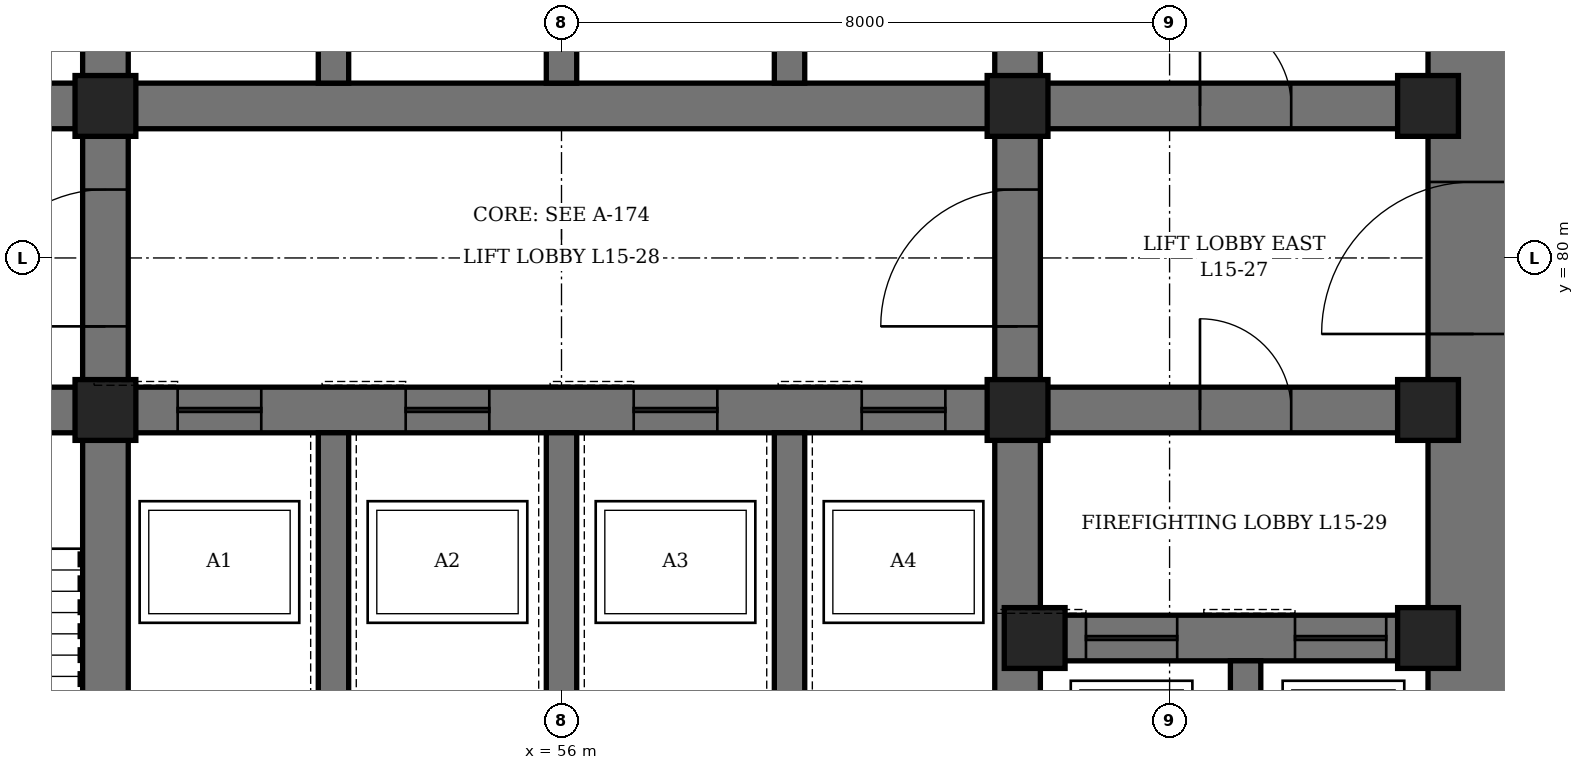
"""IFC4 building model, lengths in metres.
Left out: names, types, materials, properties, quantities, classifications, styles, units other than length and angle.
Written with IfcOpenShell. Run it as: python <this file> out.ifc"""

import sys

from ifc_helpers import new_model, si_unit, direction, frame, frame_2d, origin, origin_2d, place, context, subcontext, project, spatial, rectangle, hollow_rectangle, extrude, element, fill, save


model = new_model("IFC4")
c1 = context("Model", 3, precision=1e-05, world=origin(), true_north=direction((0.0, 1.0)))
c2 = subcontext(c1, "Body", "Model", "MODEL_VIEW")
j1 = project(units=[si_unit("LENGTHUNIT", "METRE"), si_unit("PLANEANGLEUNIT", "RADIAN")], contexts=[c1])
p1 = place(None, origin())
s1 = spatial("IfcSite", under=j1, at=p1, CompositionType="ELEMENT")
p2 = place(p1, origin())
s2 = spatial("IfcBuilding", under=s1, at=p2, CompositionType="ELEMENT")
p3 = place(p2, frame((0.0, 0.0, 72.7)))
s3 = spatial("IfcBuildingStorey", under=s2, at=p3, CompositionType="ELEMENT", Elevation=72.7)
p4 = place(p3, frame((68.0, 70.4, 0.0), z_axis=(0.0, 0.0, 1.0), x_axis=(0.0, 1.0, 0.0)))
e1 = element("IfcWall", 1, at=p4, inside=s3, PredefinedType="SHEAR", context=c2, shape_type="SweptSolid", body=[
    extrude(rectangle(XDim=19.2, YDim=1.2, at=frame_2d((9.6, 0.0))), origin(), (0.0, 0.0, 1.0), 4.2),
])
p5 = place(p4, frame((8.6, 0.0, 0.0)))
e2 = element("IfcOpeningElement", 2, at=p5, cuts=e1, PredefinedType="OPENING", context=c2, shape_type="SweptSolid", body=[
    extrude(rectangle(XDim=2.0, YDim=2.4, at=frame_2d((1.0, 1.2))), frame((0.0, 0.61, 0.0), z_axis=(0.0, -1.0, 0.0), x_axis=(1.0, 0.0, 0.0)), (0.0, 0.0, 1.0), 1.22),
])
p6 = place(p3, frame((50.0, 71.6, 0.0), z_axis=(0.0, 0.0, 1.0), x_axis=(0.0, 1.0, 0.0)))
e3 = element("IfcWall", 3, at=p6, inside=s3, PredefinedType="SHEAR", context=c2, shape_type="SweptSolid", body=[
    extrude(rectangle(XDim=16.8, YDim=0.6, at=frame_2d((8.4, 0.0))), origin(), (0.0, 0.0, 1.0), 4.2),
])
p7 = place(p6, frame((7.5, 0.0, 0.0)))
e4 = element("IfcOpeningElement", 4, at=p7, cuts=e3, PredefinedType="OPENING", context=c2, shape_type="SweptSolid", body=[
    extrude(rectangle(XDim=1.8, YDim=2.4, at=frame_2d((0.9, 1.2))), frame((0.0, 0.31, 0.0), z_axis=(0.0, -1.0, 0.0), x_axis=(1.0, 0.0, 0.0)), (0.0, 0.0, 1.0), 0.62),
])
p8 = place(p3, frame((62.0, 71.6, 0.0), z_axis=(0.0, 0.0, 1.0), x_axis=(0.0, 1.0, 0.0)))
e5 = element("IfcWall", 5, at=p8, inside=s3, PredefinedType="SHEAR", context=c2, shape_type="SweptSolid", body=[
    extrude(rectangle(XDim=16.8, YDim=0.6, at=frame_2d((8.4, 0.0))), origin(), (0.0, 0.0, 1.0), 4.2),
])
p9 = place(p8, frame((7.5, 0.0, 0.0)))
e6 = element("IfcOpeningElement", 6, at=p9, cuts=e5, PredefinedType="OPENING", context=c2, shape_type="SweptSolid", body=[
    extrude(rectangle(XDim=1.8, YDim=2.4, at=frame_2d((0.9, 1.2))), frame((0.0, 0.31, 0.0), z_axis=(0.0, -1.0, 0.0), x_axis=(1.0, 0.0, 0.0)), (0.0, 0.0, 1.0), 0.62),
])
p10 = place(p3, frame((44.6, 78.0, 0.0), z_axis=(0.0, 0.0, 1.0), x_axis=(1.0, 0.0, 0.0)))
e7 = element("IfcWall", 7, at=p10, inside=s3, PredefinedType="SHEAR", context=c2, shape_type="SweptSolid", body=[
    extrude(rectangle(XDim=5.1, YDim=0.6, at=frame_2d((2.55, 0.0))), origin(), (0.0, 0.0, 1.0), 4.2),
])
p11 = place(p10, frame((1.8, 0.0, 0.0)))
e8 = element("IfcOpeningElement", 8, at=p11, cuts=e7, PredefinedType="OPENING", context=c2, shape_type="SweptSolid", body=[
    extrude(rectangle(XDim=1.2, YDim=2.1, at=frame_2d((0.6, 1.05))), frame((0.0, 0.31, 0.0), z_axis=(0.0, -1.0, 0.0), x_axis=(1.0, 0.0, 0.0)), (0.0, 0.0, 1.0), 0.62),
])
p12 = place(p3, frame((44.6, 82.0, 0.0), z_axis=(0.0, 0.0, 1.0), x_axis=(1.0, 0.0, 0.0)))
e9 = element("IfcWall", 9, at=p12, inside=s3, PredefinedType="SHEAR", context=c2, shape_type="SweptSolid", body=[
    extrude(rectangle(XDim=5.1, YDim=0.6, at=frame_2d((2.55, 0.0))), origin(), (0.0, 0.0, 1.0), 4.2),
])
p13 = place(p12, frame((0.7, 0.0, 0.0)))
e10 = element("IfcOpeningElement", 10, at=p13, cuts=e9, PredefinedType="OPENING", context=c2, shape_type="SweptSolid", body=[
    extrude(rectangle(XDim=0.9, YDim=2.1, at=frame_2d((0.45, 1.05))), frame((0.0, 0.31, 0.0), z_axis=(0.0, -1.0, 0.0), x_axis=(1.0, 0.0, 0.0)), (0.0, 0.0, 1.0), 0.62),
])
p14 = place(p3, frame((62.3, 75.0, 0.0), z_axis=(0.0, 0.0, 1.0), x_axis=(1.0, 0.0, 0.0)))
e11 = element("IfcWall", 11, at=p14, inside=s3, PredefinedType="SHEAR", context=c2, shape_type="SweptSolid", body=[
    extrude(rectangle(XDim=5.1, YDim=0.6, at=frame_2d((2.55, 0.0))), origin(), (0.0, 0.0, 1.0), 4.2),
])
p15 = place(p14, frame((0.6, 0.0, 0.0)))
e12 = element("IfcOpeningElement", 12, at=p15, cuts=e11, PredefinedType="OPENING", context=c2, shape_type="SweptSolid", body=[
    extrude(rectangle(XDim=1.2, YDim=2.2, at=frame_2d((0.6, 1.1))), frame((0.0, 0.31, 0.0), z_axis=(0.0, -1.0, 0.0), x_axis=(1.0, 0.0, 0.0)), (0.0, 0.0, 1.0), 0.62),
])
p16 = place(p14, frame((3.35, 0.0, 0.0)))
e13 = element("IfcOpeningElement", 13, at=p16, cuts=e11, PredefinedType="OPENING", context=c2, shape_type="SweptSolid", body=[
    extrude(rectangle(XDim=1.2, YDim=2.2, at=frame_2d((0.6, 1.1))), frame((0.0, 0.31, 0.0), z_axis=(0.0, -1.0, 0.0), x_axis=(1.0, 0.0, 0.0)), (0.0, 0.0, 1.0), 0.62),
])
p17 = place(p3, frame((62.3, 78.0, 0.0), z_axis=(0.0, 0.0, 1.0), x_axis=(1.0, 0.0, 0.0)))
e14 = element("IfcWall", 14, at=p17, inside=s3, PredefinedType="SHEAR", context=c2, shape_type="SweptSolid", body=[
    extrude(rectangle(XDim=5.1, YDim=0.6, at=frame_2d((2.55, 0.0))), origin(), (0.0, 0.0, 1.0), 4.2),
])
p18 = place(p17, frame((2.1, 0.0, 0.0)))
e15 = element("IfcOpeningElement", 15, at=p18, cuts=e14, PredefinedType="OPENING", context=c2, shape_type="SweptSolid", body=[
    extrude(rectangle(XDim=1.2, YDim=2.1, at=frame_2d((0.6, 1.05))), frame((0.0, 0.31, 0.0), z_axis=(0.0, -1.0, 0.0), x_axis=(1.0, 0.0, 0.0)), (0.0, 0.0, 1.0), 0.62),
])
p19 = place(p3, frame((62.3, 82.0, 0.0), z_axis=(0.0, 0.0, 1.0), x_axis=(1.0, 0.0, 0.0)))
e16 = element("IfcWall", 16, at=p19, inside=s3, PredefinedType="SHEAR", context=c2, shape_type="SweptSolid", body=[
    extrude(rectangle(XDim=5.1, YDim=0.6, at=frame_2d((2.55, 0.0))), origin(), (0.0, 0.0, 1.0), 4.2),
])
p20 = place(p19, frame((2.1, 0.0, 0.0)))
e17 = element("IfcOpeningElement", 17, at=p20, cuts=e16, PredefinedType="OPENING", context=c2, shape_type="SweptSolid", body=[
    extrude(rectangle(XDim=1.2, YDim=2.1, at=frame_2d((0.6, 1.05))), frame((0.0, 0.31, 0.0), z_axis=(0.0, -1.0, 0.0), x_axis=(1.0, 0.0, 0.0)), (0.0, 0.0, 1.0), 0.62),
])
p21 = place(p3, frame((50.3, 78.0, 0.0), z_axis=(0.0, 0.0, 1.0), x_axis=(1.0, 0.0, 0.0)))
e18 = element("IfcWall", 18, at=p21, inside=s3, PredefinedType="SHEAR", context=c2, shape_type="SweptSolid", body=[
    extrude(rectangle(XDim=11.4, YDim=0.6, at=frame_2d((5.7, 0.0))), origin(), (0.0, 0.0, 1.0), 4.2),
])
p22 = place(p21, frame((0.65, 0.0, 0.0)))
e19 = element("IfcOpeningElement", 19, at=p22, cuts=e18, PredefinedType="OPENING", context=c2, shape_type="SweptSolid", body=[
    extrude(rectangle(XDim=1.1, YDim=2.2, at=frame_2d((0.55, 1.1))), frame((0.0, 0.31, 0.0), z_axis=(0.0, -1.0, 0.0), x_axis=(1.0, 0.0, 0.0)), (0.0, 0.0, 1.0), 0.62),
])
p23 = place(p21, frame((3.65, 0.0, 0.0)))
e20 = element("IfcOpeningElement", 20, at=p23, cuts=e18, PredefinedType="OPENING", context=c2, shape_type="SweptSolid", body=[
    extrude(rectangle(XDim=1.1, YDim=2.2, at=frame_2d((0.55, 1.1))), frame((0.0, 0.31, 0.0), z_axis=(0.0, -1.0, 0.0), x_axis=(1.0, 0.0, 0.0)), (0.0, 0.0, 1.0), 0.62),
])
p24 = place(p21, frame((6.65, 0.0, 0.0)))
e21 = element("IfcOpeningElement", 21, at=p24, cuts=e18, PredefinedType="OPENING", context=c2, shape_type="SweptSolid", body=[
    extrude(rectangle(XDim=1.1, YDim=2.2, at=frame_2d((0.55, 1.1))), frame((0.0, 0.31, 0.0), z_axis=(0.0, -1.0, 0.0), x_axis=(1.0, 0.0, 0.0)), (0.0, 0.0, 1.0), 0.62),
])
p25 = place(p21, frame((9.65, 0.0, 0.0)))
e22 = element("IfcOpeningElement", 22, at=p25, cuts=e18, PredefinedType="OPENING", context=c2, shape_type="SweptSolid", body=[
    extrude(rectangle(XDim=1.1, YDim=2.2, at=frame_2d((0.55, 1.1))), frame((0.0, 0.31, 0.0), z_axis=(0.0, -1.0, 0.0), x_axis=(1.0, 0.0, 0.0)), (0.0, 0.0, 1.0), 0.62),
])
p26 = place(p3, frame((50.3, 82.0, 0.0), z_axis=(0.0, 0.0, 1.0), x_axis=(1.0, 0.0, 0.0)))
e23 = element("IfcWall", 23, at=p26, inside=s3, PredefinedType="SHEAR", context=c2, shape_type="SweptSolid", body=[
    extrude(rectangle(XDim=11.4, YDim=0.6, at=frame_2d((5.7, 0.0))), origin(), (0.0, 0.0, 1.0), 4.2),
])
p27 = place(p3, frame((53.0, 74.2, 0.0), z_axis=(0.0, 0.0, 1.0), x_axis=(0.0, 1.0, 0.0)))
e24 = element("IfcWall", 24, at=p27, inside=s3, PredefinedType="SHEAR", context=c2, shape_type="SweptSolid", body=[
    extrude(rectangle(XDim=3.5, YDim=0.4, at=frame_2d((1.75, 0.0))), origin(), (0.0, 0.0, 1.0), 4.2),
])
p28 = place(p3, frame((53.0, 82.3, 0.0), z_axis=(0.0, 0.0, 1.0), x_axis=(0.0, 1.0, 0.0)))
e25 = element("IfcWall", 25, at=p28, inside=s3, PredefinedType="SHEAR", context=c2, shape_type="SweptSolid", body=[
    extrude(rectangle(XDim=3.4, YDim=0.4, at=frame_2d((1.7, 0.0))), origin(), (0.0, 0.0, 1.0), 4.2),
])
p29 = place(p3, frame((56.0, 74.2, 0.0), z_axis=(0.0, 0.0, 1.0), x_axis=(0.0, 1.0, 0.0)))
e26 = element("IfcWall", 26, at=p29, inside=s3, PredefinedType="SHEAR", context=c2, shape_type="SweptSolid", body=[
    extrude(rectangle(XDim=3.5, YDim=0.4, at=frame_2d((1.75, 0.0))), origin(), (0.0, 0.0, 1.0), 4.2),
])
p30 = place(p3, frame((56.0, 82.3, 0.0), z_axis=(0.0, 0.0, 1.0), x_axis=(0.0, 1.0, 0.0)))
e27 = element("IfcWall", 27, at=p30, inside=s3, PredefinedType="SHEAR", context=c2, shape_type="SweptSolid", body=[
    extrude(rectangle(XDim=3.4, YDim=0.4, at=frame_2d((1.7, 0.0))), origin(), (0.0, 0.0, 1.0), 4.2),
])
p31 = place(p3, frame((59.0, 74.2, 0.0), z_axis=(0.0, 0.0, 1.0), x_axis=(0.0, 1.0, 0.0)))
e28 = element("IfcWall", 28, at=p31, inside=s3, PredefinedType="SHEAR", context=c2, shape_type="SweptSolid", body=[
    extrude(rectangle(XDim=3.5, YDim=0.4, at=frame_2d((1.75, 0.0))), origin(), (0.0, 0.0, 1.0), 4.2),
])
p32 = place(p3, frame((59.0, 82.3, 0.0), z_axis=(0.0, 0.0, 1.0), x_axis=(0.0, 1.0, 0.0)))
e29 = element("IfcWall", 29, at=p32, inside=s3, PredefinedType="SHEAR", context=c2, shape_type="SweptSolid", body=[
    extrude(rectangle(XDim=3.4, YDim=0.4, at=frame_2d((1.7, 0.0))), origin(), (0.0, 0.0, 1.0), 4.2),
])
p33 = place(p3, frame((65.0, 71.6, 0.0), z_axis=(0.0, 0.0, 1.0), x_axis=(0.0, 1.0, 0.0)))
e30 = element("IfcWall", 30, at=p33, inside=s3, PredefinedType="SHEAR", context=c2, shape_type="SweptSolid", body=[
    extrude(rectangle(XDim=3.1, YDim=0.4, at=frame_2d((1.55, 0.0))), origin(), (0.0, 0.0, 1.0), 4.2),
])
for number, where, z_axis, x_axis in (
    (31, (50.0, 78.0, 0.0), (0.0, 0.0, 1.0), (1.0, 0.0, 0.0)),
    (32, (50.0, 82.0, 0.0), (0.0, 0.0, 1.0), (1.0, 0.0, 0.0)),
    (33, (62.0, 78.0, 0.0), (0.0, 0.0, 1.0), (1.0, 0.0, 0.0)),
    (34, (62.0, 82.0, 0.0), (0.0, 0.0, 1.0), (1.0, 0.0, 0.0)),
    (35, (62.225, 75.0, 0.0), (0.0, 0.0, 1.0), (1.0, 0.0, 0.0)),
    (36, (67.4, 75.0, 0.0), (0.0, 0.0, 1.0), (1.0, 0.0, 0.0)),
    (37, (67.4, 78.0, 0.0), (0.0, 0.0, 1.0), (1.0, 0.0, 0.0)),
    (38, (67.4, 82.0, 0.0), (0.0, 0.0, 1.0), (1.0, 0.0, 0.0)),
):
    element("IfcColumn", number, at=place(p3, frame(where, z_axis=z_axis, x_axis=x_axis)), inside=s3, PredefinedType="COLUMN", context=c2, shape_type="SweptSolid", body=[
        extrude(hollow_rectangle(XDim=0.8, YDim=0.8, WallThickness=0.1, at=origin_2d()), origin(), (0.0, 0.0, 1.0), 4.2),
    ])
p34 = place(p20, origin())
e39 = element("IfcDoor", 39, at=p34, inside=s3, OperationType="SINGLE_SWING_LEFT", PredefinedType="DOOR", context=c2, shape_type="SweptSolid", body=[
    extrude(rectangle(XDim=1.2, YDim=2.1, at=frame_2d((0.6, 1.05))), frame((0.0, 0.3, 0.0), z_axis=(0.0, -1.0, 0.0), x_axis=(1.0, 0.0, 0.0)), (0.0, 0.0, 1.0), 0.6),
])
fill(e17, e39)
p35 = place(p5, origin())
e40 = element("IfcDoor", 40, at=p35, inside=s3, OperationType="DOUBLE_DOOR_SINGLE_SWING", PredefinedType="DOOR", context=c2, shape_type="SweptSolid", body=[
    extrude(rectangle(XDim=2.0, YDim=2.4, at=frame_2d((1.0, 1.2))), frame((0.0, 0.35, 0.0), z_axis=(0.0, -1.0, 0.0), x_axis=(1.0, 0.0, 0.0)), (0.0, 0.0, 1.0), 0.7),
])
fill(e2, e40)
p36 = place(p7, origin())
e41 = element("IfcDoor", 41, at=p36, inside=s3, OperationType="DOUBLE_DOOR_SINGLE_SWING", PredefinedType="DOOR", context=c2, shape_type="SweptSolid", body=[
    extrude(rectangle(XDim=1.8, YDim=2.4, at=frame_2d((0.9, 1.2))), frame((0.0, 0.3, 0.0), z_axis=(0.0, -1.0, 0.0), x_axis=(1.0, 0.0, 0.0)), (0.0, 0.0, 1.0), 0.6),
])
fill(e4, e41)
p37 = place(p9, origin())
e42 = element("IfcDoor", 42, at=p37, inside=s3, OperationType="DOUBLE_DOOR_SINGLE_SWING", PredefinedType="DOOR", context=c2, shape_type="SweptSolid", body=[
    extrude(rectangle(XDim=1.8, YDim=2.4, at=frame_2d((0.9, 1.2))), frame((0.0, 0.3, 0.0), z_axis=(0.0, -1.0, 0.0), x_axis=(1.0, 0.0, 0.0)), (0.0, 0.0, 1.0), 0.6),
])
fill(e6, e42)
p38 = place(p18, origin())
e43 = element("IfcDoor", 43, at=p38, inside=s3, OperationType="SINGLE_SWING_RIGHT", PredefinedType="DOOR", context=c2, shape_type="SweptSolid", body=[
    extrude(rectangle(XDim=1.2, YDim=2.1, at=frame_2d((0.6, 1.05))), frame((0.0, 0.3, 0.0), z_axis=(0.0, -1.0, 0.0), x_axis=(1.0, 0.0, 0.0)), (0.0, 0.0, 1.0), 0.6),
])
fill(e15, e43)
p39 = place(p22, origin())
e44 = element("IfcDoor", 44, at=p39, inside=s3, OperationType="SLIDING_TO_LEFT", PredefinedType="DOOR", context=c2, shape_type="SweptSolid", body=[
    extrude(rectangle(XDim=1.1, YDim=2.2, at=frame_2d((0.55, 1.1))), frame((0.0, 0.3, 0.0), z_axis=(0.0, -1.0, 0.0), x_axis=(1.0, 0.0, 0.0)), (0.0, 0.0, 1.0), 0.6),
])
fill(e19, e44)
p40 = place(p23, origin())
e45 = element("IfcDoor", 45, at=p40, inside=s3, OperationType="SLIDING_TO_LEFT", PredefinedType="DOOR", context=c2, shape_type="SweptSolid", body=[
    extrude(rectangle(XDim=1.1, YDim=2.2, at=frame_2d((0.55, 1.1))), frame((0.0, 0.3, 0.0), z_axis=(0.0, -1.0, 0.0), x_axis=(1.0, 0.0, 0.0)), (0.0, 0.0, 1.0), 0.6),
])
fill(e20, e45)
p41 = place(p24, origin())
e46 = element("IfcDoor", 46, at=p41, inside=s3, OperationType="SLIDING_TO_LEFT", PredefinedType="DOOR", context=c2, shape_type="SweptSolid", body=[
    extrude(rectangle(XDim=1.1, YDim=2.2, at=frame_2d((0.55, 1.1))), frame((0.0, 0.3, 0.0), z_axis=(0.0, -1.0, 0.0), x_axis=(1.0, 0.0, 0.0)), (0.0, 0.0, 1.0), 0.6),
])
fill(e21, e46)
p42 = place(p25, origin())
e47 = element("IfcDoor", 47, at=p42, inside=s3, OperationType="SLIDING_TO_LEFT", PredefinedType="DOOR", context=c2, shape_type="SweptSolid", body=[
    extrude(rectangle(XDim=1.1, YDim=2.2, at=frame_2d((0.55, 1.1))), frame((0.0, 0.3, 0.0), z_axis=(0.0, -1.0, 0.0), x_axis=(1.0, 0.0, 0.0)), (0.0, 0.0, 1.0), 0.6),
])
fill(e22, e47)
p43 = place(p15, origin())
e48 = element("IfcDoor", 48, at=p43, inside=s3, OperationType="SLIDING_TO_LEFT", PredefinedType="DOOR", context=c2, shape_type="SweptSolid", body=[
    extrude(rectangle(XDim=1.2, YDim=2.2, at=frame_2d((0.6, 1.1))), frame((0.0, 0.3, 0.0), z_axis=(0.0, -1.0, 0.0), x_axis=(1.0, 0.0, 0.0)), (0.0, 0.0, 1.0), 0.6),
])
fill(e12, e48)
p44 = place(p16, origin())
e49 = element("IfcDoor", 49, at=p44, inside=s3, OperationType="SLIDING_TO_LEFT", PredefinedType="DOOR", context=c2, shape_type="SweptSolid", body=[
    extrude(rectangle(XDim=1.2, YDim=2.2, at=frame_2d((0.6, 1.1))), frame((0.0, 0.3, 0.0), z_axis=(0.0, -1.0, 0.0), x_axis=(1.0, 0.0, 0.0)), (0.0, 0.0, 1.0), 0.6),
])
fill(e13, e49)
save(model, sys.argv[1])
